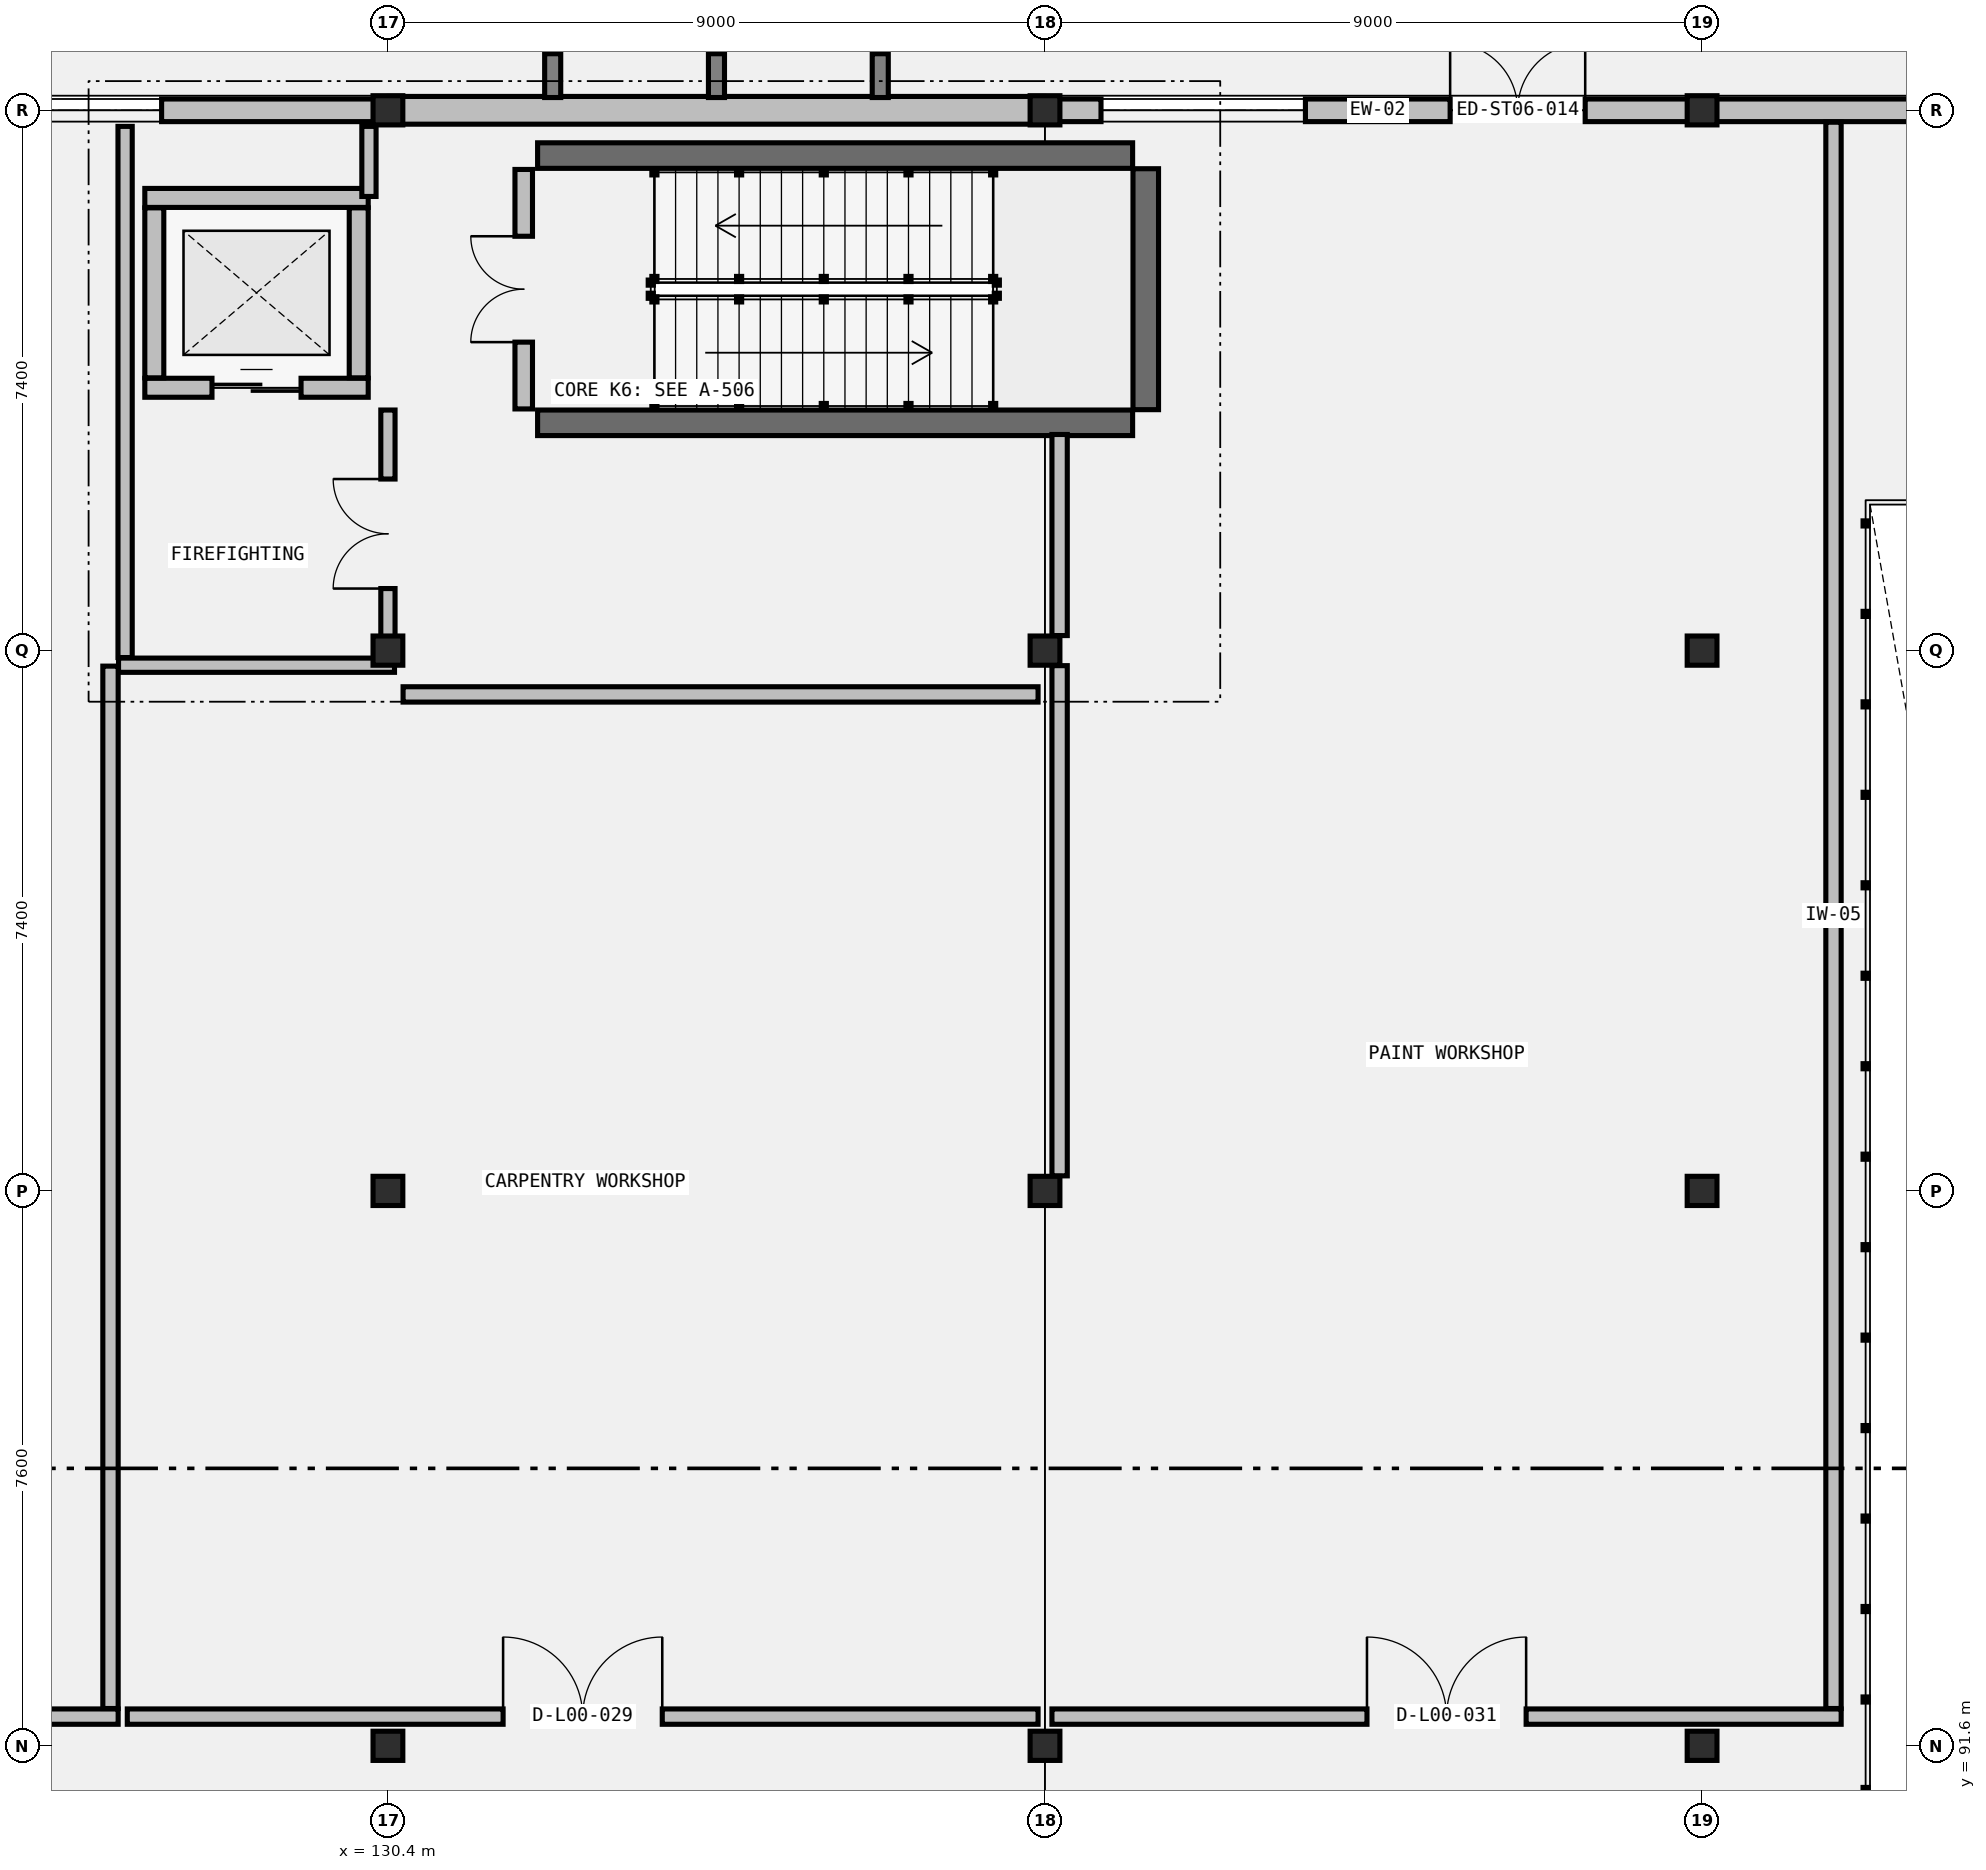
"""IFC4 building model, lengths in metres.
Left out: names, types, materials, properties, quantities, classifications, styles, units other than length and angle.
Written with IfcOpenShell. Run it as: python <this file> out.ifc"""

import sys

from ifc_helpers import new_model, si_unit, direction, frame, frame_2d, origin, origin_2d, place, context, subcontext, project, spatial, rectangle, i_section, extrude, element, fill, save


model = new_model("IFC4")
c1 = context("Model", 3, precision=1e-05, world=origin(), true_north=direction((0.0, 1.0)))
c2 = subcontext(c1, "Body", "Model", "MODEL_VIEW")
j1 = project(units=[si_unit("LENGTHUNIT", "METRE"), si_unit("PLANEANGLEUNIT", "RADIAN")], contexts=[c1])
p1 = place(None, origin())
s1 = spatial("IfcSite", under=j1, at=p1, CompositionType="ELEMENT")
p2 = place(p1, origin())
s2 = spatial("IfcBuilding", under=s1, at=p2, CompositionType="ELEMENT")
p3 = place(p2, origin())
s3 = spatial("IfcBuildingStorey", under=s2, at=p3, CompositionType="ELEMENT", Elevation=0.0)
for number, where, z_axis, x_axis in (
    (1, (130.4, 91.6, 0.0), (0.0, 0.0, 1.0), (1.0, 0.0, 0.0)),
    (2, (130.4, 99.2, 0.0), (0.0, 0.0, 1.0), (1.0, 0.0, 0.0)),
    (3, (130.4, 106.6, 0.0), (0.0, 0.0, 1.0), (1.0, 0.0, 0.0)),
    (4, (130.4, 114.0, 0.0), (0.0, 0.0, 1.0), (1.0, 0.0, 0.0)),
    (5, (139.4, 91.6, 0.0), (0.0, 0.0, 1.0), (1.0, 0.0, 0.0)),
    (6, (139.4, 99.2, 0.0), (0.0, 0.0, 1.0), (1.0, 0.0, 0.0)),
    (7, (139.4, 106.6, 0.0), (0.0, 0.0, 1.0), (1.0, 0.0, 0.0)),
    (8, (139.4, 114.0, 0.0), (0.0, 0.0, 1.0), (1.0, 0.0, 0.0)),
    (9, (148.4, 91.6, 0.0), (0.0, 0.0, 1.0), (1.0, 0.0, 0.0)),
    (10, (148.4, 99.2, 0.0), (0.0, 0.0, 1.0), (1.0, 0.0, 0.0)),
    (11, (148.4, 106.6, 0.0), (0.0, 0.0, 1.0), (1.0, 0.0, 0.0)),
    (12, (148.4, 114.0, 0.0), (0.0, 0.0, 1.0), (1.0, 0.0, 0.0)),
):
    element("IfcColumn", number, at=place(p3, frame(where, z_axis=z_axis, x_axis=x_axis)), inside=s3, PredefinedType="COLUMN", context=c2, shape_type="SweptSolid", body=[
        extrude(i_section(OverallWidth=0.408, OverallDepth=0.4, WebThickness=0.021, FlangeThickness=0.021, FilletRadius=0.022, at=origin_2d()), origin(), (0.0, 0.0, 1.0), 5.4),
    ])
p4 = place(p3, frame((132.45, 109.72, 0.0), z_axis=(0.0, 0.0, 1.0), x_axis=(1.0, 0.0, 0.0)))
e13 = element("IfcWall", 13, at=p4, inside=s3, PredefinedType="SHEAR", context=c2, shape_type="SweptSolid", body=[
    extrude(rectangle(XDim=8.15, YDim=0.35, at=frame_2d((4.075, 0.0))), origin(), (0.0, 0.0, 1.0), 5.16),
])
p5 = place(p3, frame((140.78, 109.9, 0.0), z_axis=(0.0, 0.0, 1.0), x_axis=(0.0, 1.0, 0.0)))
e14 = element("IfcWall", 14, at=p5, inside=s3, PredefinedType="SHEAR", context=c2, shape_type="SweptSolid", body=[
    extrude(rectangle(XDim=3.3, YDim=0.35, at=frame_2d((1.65, 0.0))), origin(), (0.0, 0.0, 1.0), 5.16),
])
p6 = place(p3, frame((140.6, 113.38, 0.0), z_axis=(0.0, 0.0, 1.0), x_axis=(-1.0, 0.0, 0.0)))
e15 = element("IfcWall", 15, at=p6, inside=s3, PredefinedType="SHEAR", context=c2, shape_type="SweptSolid", body=[
    extrude(rectangle(XDim=8.15, YDim=0.35, at=frame_2d((4.075, 0.0))), origin(), (0.0, 0.0, 1.0), 5.16),
])
p7 = place(p3, frame((121.414, 114.0, 0.0), z_axis=(0.0, 0.0, 1.0), x_axis=(1.0, 0.0, 0.0)))
e16 = element("IfcWall", 16, at=p7, inside=s3, PredefinedType="STANDARD", context=c2, shape_type="SweptSolid", body=[
    extrude(rectangle(XDim=8.973, YDim=0.31, at=frame_2d((4.486, 0.0))), origin(), (0.0, 0.0, 1.0), 4.55),
])
p8 = place(p7, frame((3.086, 0.0, 0.9)))
e17 = element("IfcOpeningElement", 17, at=p8, cuts=e16, PredefinedType="OPENING", context=c2, shape_type="SweptSolid", body=[
    extrude(rectangle(XDim=2.8, YDim=1.5, at=frame_2d((1.4, 0.75))), frame((0.0, 0.165, 0.0), z_axis=(0.0, -1.0, 0.0), x_axis=(1.0, 0.0, 0.0)), (0.0, 0.0, 1.0), 0.33),
])
p9 = place(p3, frame((130.414, 114.0, 0.0), z_axis=(0.0, 0.0, 1.0), x_axis=(1.0, 0.0, 0.0)))
e18 = element("IfcWall", 18, at=p9, inside=s3, PredefinedType="STANDARD", context=c2, shape_type="SweptSolid", body=[
    extrude(rectangle(XDim=8.973, YDim=0.38, at=frame_2d((4.486, 0.0))), origin(), (0.0, 0.0, 1.0), 4.55),
])
p10 = place(p3, frame((139.414, 114.0, 0.0), z_axis=(0.0, 0.0, 1.0), x_axis=(1.0, 0.0, 0.0)))
e19 = element("IfcWall", 19, at=p10, inside=s3, PredefinedType="STANDARD", context=c2, shape_type="SweptSolid", body=[
    extrude(rectangle(XDim=8.973, YDim=0.31, at=frame_2d((4.486, 0.0))), origin(), (0.0, 0.0, 1.0), 4.55),
])
p11 = place(p10, frame((0.753, 0.0, 0.9)))
e20 = element("IfcOpeningElement", 20, at=p11, cuts=e19, PredefinedType="OPENING", context=c2, shape_type="SweptSolid", body=[
    extrude(rectangle(XDim=2.8, YDim=1.5, at=frame_2d((1.4, 0.75))), frame((0.0, 0.165, 0.0), z_axis=(0.0, -1.0, 0.0), x_axis=(1.0, 0.0, 0.0)), (0.0, 0.0, 1.0), 0.33),
])
p12 = place(p10, frame((5.536, 0.0, 0.0)))
e21 = element("IfcOpeningElement", 21, at=p12, cuts=e19, PredefinedType="OPENING", context=c2, shape_type="SweptSolid", body=[
    extrude(rectangle(XDim=1.85, YDim=2.35, at=frame_2d((0.925, 1.175))), frame((0.0, 0.165, 0.0), z_axis=(0.0, -1.0, 0.0), x_axis=(1.0, 0.0, 0.0)), (0.0, 0.0, 1.0), 0.33),
])
p13 = place(p3, frame((148.414, 114.0, 0.0), z_axis=(0.0, 0.0, 1.0), x_axis=(1.0, 0.0, 0.0)))
e22 = element("IfcWall", 22, at=p13, inside=s3, PredefinedType="STANDARD", context=c2, shape_type="SweptSolid", body=[
    extrude(rectangle(XDim=8.773, YDim=0.31, at=frame_2d((4.386, 0.0))), origin(), (0.0, 0.0, 1.0), 4.55),
])
p14 = place(p13, frame((3.461, 0.0, 0.0)))
e23 = element("IfcOpeningElement", 23, at=p14, cuts=e22, PredefinedType="OPENING", context=c2, shape_type="SweptSolid", body=[
    extrude(rectangle(XDim=1.85, YDim=2.35, at=frame_2d((0.925, 1.175))), frame((0.0, 0.165, 0.0), z_axis=(0.0, -1.0, 0.0), x_axis=(1.0, 0.0, 0.0)), (0.0, 0.0, 1.0), 0.33),
])
p15 = place(p3, frame((132.26, 109.91, 0.0), z_axis=(0.0, 0.0, 1.0), x_axis=(0.0, 1.0, 0.0)))
e24 = element("IfcWall", 24, at=p15, inside=s3, PredefinedType="STANDARD", context=c2, shape_type="SweptSolid", body=[
    extrude(rectangle(XDim=3.28, YDim=0.24, at=frame_2d((1.64, 0.0))), origin(), (0.0, 0.0, 1.0), 5.16),
])
p16 = place(p15, frame((0.915, 0.0, 0.0)))
e25 = element("IfcOpeningElement", 25, at=p16, cuts=e24, PredefinedType="OPENING", context=c2, shape_type="SweptSolid", body=[
    extrude(rectangle(XDim=1.45, YDim=2.2, at=frame_2d((0.725, 1.1))), frame((0.0, 0.13, 0.0), z_axis=(0.0, -1.0, 0.0), x_axis=(1.0, 0.0, 0.0)), (0.0, 0.0, 1.0), 0.26),
])
p17 = place(p3, frame((127.07, 110.2, 0.0), z_axis=(0.0, 0.0, 1.0), x_axis=(1.0, 0.0, 0.0)))
e26 = element("IfcWall", 26, at=p17, inside=s3, PredefinedType="STANDARD", context=c2, shape_type="SweptSolid", body=[
    extrude(rectangle(XDim=3.06, YDim=0.26, at=frame_2d((1.53, 0.0))), origin(), (0.0, 0.0, 1.0), 4.748),
])
p18 = place(p17, frame((0.92, 0.0, 0.0)))
e27 = element("IfcOpeningElement", 27, at=p18, cuts=e26, PredefinedType="OPENING", context=c2, shape_type="SweptSolid", body=[
    extrude(rectangle(XDim=1.22, YDim=2.2, at=frame_2d((0.61, 1.1))), frame((0.0, 0.14, 0.0), z_axis=(0.0, -1.0, 0.0), x_axis=(1.0, 0.0, 0.0)), (0.0, 0.0, 1.0), 0.28),
])
p19 = place(p3, frame((127.07, 112.8, 0.0), z_axis=(0.0, 0.0, 1.0), x_axis=(1.0, 0.0, 0.0)))
e28 = element("IfcWall", 28, at=p19, inside=s3, PredefinedType="STANDARD", context=c2, shape_type="SweptSolid", body=[
    extrude(rectangle(XDim=3.06, YDim=0.26, at=frame_2d((1.53, 0.0))), origin(), (0.0, 0.0, 1.0), 4.748),
])
for number, where, z_axis, x_axis in (
    (29, (127.2, 110.336, 0.0), (0.0, 0.0, 1.0), (0.0, 1.0, 0.0)),
    (30, (130.0, 110.336, 0.0), (0.0, 0.0, 1.0), (0.0, 1.0, 0.0)),
):
    element("IfcWall", number, at=place(p3, frame(where, z_axis=z_axis, x_axis=x_axis)), inside=s3, PredefinedType="STANDARD", context=c2, shape_type="SweptSolid", body=[
        extrude(rectangle(XDim=2.328, YDim=0.26, at=frame_2d((1.164, 0.0))), origin(), (0.0, 0.0, 1.0), 5.16),
    ])
p20 = place(p3, frame((126.8, 106.505, 0.0), z_axis=(0.0, 0.0, 1.0), x_axis=(0.0, 1.0, 0.0)))
e31 = element("IfcWall", 31, at=p20, inside=s3, PredefinedType="PARTITIONING", context=c2, shape_type="SweptSolid", body=[
    extrude(rectangle(XDim=7.275, YDim=0.195, at=frame_2d((3.638, 0.0))), origin(), (0.0, 0.0, 1.0), 4.55),
])
p21 = place(p3, frame((126.71, 106.4, 0.0), z_axis=(0.0, 0.0, 1.0), x_axis=(1.0, 0.0, 0.0)))
e32 = element("IfcWall", 32, at=p21, inside=s3, PredefinedType="PARTITIONING", context=c2, shape_type="SweptSolid", body=[
    extrude(rectangle(XDim=3.78, YDim=0.195, at=frame_2d((1.89, 0.0))), origin(), (0.0, 0.0, 1.0), 4.55),
])
p22 = place(p3, frame((130.4, 106.505, 0.0), z_axis=(0.0, 0.0, 1.0), x_axis=(0.0, 1.0, 0.0)))
e33 = element("IfcWall", 33, at=p22, inside=s3, PredefinedType="PARTITIONING", context=c2, shape_type="SweptSolid", body=[
    extrude(rectangle(XDim=3.39, YDim=0.195, at=frame_2d((1.695, 0.0))), origin(), (0.0, 0.0, 1.0), 4.55),
])
p23 = place(p22, frame((0.945, 0.0, 0.0)))
e34 = element("IfcOpeningElement", 34, at=p23, cuts=e33, PredefinedType="OPENING", context=c2, shape_type="SweptSolid", body=[
    extrude(rectangle(XDim=1.5, YDim=2.2, at=frame_2d((0.75, 1.1))), frame((0.0, 0.107, 0.0), z_axis=(0.0, -1.0, 0.0), x_axis=(1.0, 0.0, 0.0)), (0.0, 0.0, 1.0), 0.215),
])
p24 = place(p3, frame((130.14, 112.82, 0.0), z_axis=(0.0, 0.0, 1.0), x_axis=(0.0, 1.0, 0.0)))
e35 = element("IfcWall", 35, at=p24, inside=s3, PredefinedType="PARTITIONING", context=c2, shape_type="SweptSolid", body=[
    extrude(rectangle(XDim=0.96, YDim=0.195, at=frame_2d((0.48, 0.0))), origin(), (0.0, 0.0, 1.0), 4.55),
])
p25 = place(p3, frame((112.858, 92.0, 0.0), z_axis=(0.0, 0.0, 1.0), x_axis=(1.0, 0.0, 0.0)))
e36 = element("IfcWall", 36, at=p25, inside=s3, PredefinedType="PARTITIONING", context=c2, shape_type="SweptSolid", body=[
    extrude(rectangle(XDim=13.847, YDim=0.21, at=frame_2d((6.924, 0.0))), origin(), (0.0, 0.0, 1.0), 5.16),
])
p26 = place(p25, frame((5.833, 0.0, 0.0)))
e37 = element("IfcOpeningElement", 37, at=p26, cuts=e36, PredefinedType="OPENING", context=c2, shape_type="SweptSolid", body=[
    extrude(rectangle(XDim=2.18, YDim=2.58, at=frame_2d((1.09, 1.29))), frame((0.0, 0.115, 0.0), z_axis=(0.0, -1.0, 0.0), x_axis=(1.0, 0.0, 0.0)), (0.0, 0.0, 1.0), 0.23),
])
p27 = place(p3, frame((126.6, 92.111, 0.0), z_axis=(0.0, 0.0, 1.0), x_axis=(0.0, 1.0, 0.0)))
e38 = element("IfcWall", 38, at=p27, inside=s3, PredefinedType="PARTITIONING", context=c2, shape_type="SweptSolid", body=[
    extrude(rectangle(XDim=14.276, YDim=0.21, at=frame_2d((7.138, 0.0))), origin(), (0.0, 0.0, 1.0), 5.16),
])
p28 = place(p3, frame((126.83, 92.0, 0.0), z_axis=(0.0, 0.0, 1.0), x_axis=(1.0, 0.0, 0.0)))
e39 = element("IfcWall", 39, at=p28, inside=s3, PredefinedType="PARTITIONING", context=c2, shape_type="SweptSolid", body=[
    extrude(rectangle(XDim=12.475, YDim=0.21, at=frame_2d((6.237, 0.0))), origin(), (0.0, 0.0, 1.0), 4.748),
])
p29 = place(p28, frame((5.147, 0.0, 0.0)))
e40 = element("IfcOpeningElement", 40, at=p29, cuts=e39, PredefinedType="OPENING", context=c2, shape_type="SweptSolid", body=[
    extrude(rectangle(XDim=2.18, YDim=2.58, at=frame_2d((1.09, 1.29))), frame((0.0, 0.115, 0.0), z_axis=(0.0, -1.0, 0.0), x_axis=(1.0, 0.0, 0.0)), (0.0, 0.0, 1.0), 0.23),
])
p30 = place(p3, frame((130.607, 106.0, 0.0), z_axis=(0.0, 0.0, 1.0), x_axis=(1.0, 0.0, 0.0)))
e41 = element("IfcWall", 41, at=p30, inside=s3, PredefinedType="PARTITIONING", context=c2, shape_type="SweptSolid", body=[
    extrude(rectangle(XDim=8.698, YDim=0.21, at=frame_2d((4.349, 0.0))), origin(), (0.0, 0.0, 1.0), 4.748),
])
p31 = place(p3, frame((139.495, 92.0, 0.0), z_axis=(0.0, 0.0, 1.0), x_axis=(1.0, 0.0, 0.0)))
e42 = element("IfcWall", 42, at=p31, inside=s3, PredefinedType="PARTITIONING", context=c2, shape_type="SweptSolid", body=[
    extrude(rectangle(XDim=10.81, YDim=0.21, at=frame_2d((5.405, 0.0))), origin(), (0.0, 0.0, 1.0), 4.748),
])
p32 = place(p31, frame((4.315, 0.0, 0.0)))
e43 = element("IfcOpeningElement", 43, at=p32, cuts=e42, PredefinedType="OPENING", context=c2, shape_type="SweptSolid", body=[
    extrude(rectangle(XDim=2.18, YDim=2.58, at=frame_2d((1.09, 1.29))), frame((0.0, 0.115, 0.0), z_axis=(0.0, -1.0, 0.0), x_axis=(1.0, 0.0, 0.0)), (0.0, 0.0, 1.0), 0.23),
])
p33 = place(p3, frame((139.6, 106.806, 0.0), z_axis=(0.0, 0.0, 1.0), x_axis=(0.0, 1.0, 0.0)))
e44 = element("IfcWall", 44, at=p33, inside=s3, PredefinedType="PARTITIONING", context=c2, shape_type="SweptSolid", body=[
    extrude(rectangle(XDim=2.754, YDim=0.21, at=frame_2d((1.377, 0.0))), origin(), (0.0, 0.0, 1.0), 4.55),
])
p34 = place(p3, frame((139.6, 99.406, 0.0), z_axis=(0.0, 0.0, 1.0), x_axis=(0.0, 1.0, 0.0)))
e45 = element("IfcWall", 45, at=p34, inside=s3, PredefinedType="PARTITIONING", context=c2, shape_type="SweptSolid", body=[
    extrude(rectangle(XDim=6.988, YDim=0.21, at=frame_2d((3.494, 0.0))), origin(), (0.0, 0.0, 1.0), 4.55),
])
p35 = place(p3, frame((150.2, 92.111, 0.0), z_axis=(0.0, 0.0, 1.0), x_axis=(0.0, 1.0, 0.0)))
e46 = element("IfcWall", 46, at=p35, inside=s3, PredefinedType="PARTITIONING", context=c2, shape_type="SweptSolid", body=[
    extrude(rectangle(XDim=21.726, YDim=0.21, at=frame_2d((10.863, 0.0))), origin(), (0.0, 0.0, 1.0), 4.55),
])
p36 = place(p8, origin())
e47 = element("IfcWindow", 47, at=p36, inside=s3, PartitioningType="TRIPLE_PANEL_VERTICAL", PredefinedType="WINDOW", context=c2, shape_type="SweptSolid", body=[
    extrude(rectangle(XDim=2.8, YDim=1.5, at=frame_2d((1.4, 0.75))), frame((0.0, 0.03, 0.0), z_axis=(0.0, -1.0, 0.0), x_axis=(1.0, 0.0, 0.0)), (0.0, 0.0, 1.0), 0.06),
])
fill(e17, e47)
p37 = place(p11, origin())
e48 = element("IfcWindow", 48, at=p37, inside=s3, PartitioningType="TRIPLE_PANEL_VERTICAL", PredefinedType="WINDOW", context=c2, shape_type="SweptSolid", body=[
    extrude(rectangle(XDim=2.8, YDim=1.5, at=frame_2d((1.4, 0.75))), frame((0.0, 0.03, 0.0), z_axis=(0.0, -1.0, 0.0), x_axis=(1.0, 0.0, 0.0)), (0.0, 0.0, 1.0), 0.06),
])
fill(e20, e48)
p38 = place(p12, origin())
e49 = element("IfcDoor", 49, at=p38, inside=s3, OperationType="DOUBLE_DOOR_SINGLE_SWING", PredefinedType="DOOR", context=c2, shape_type="SweptSolid", body=[
    extrude(rectangle(XDim=1.85, YDim=2.35, at=frame_2d((0.925, 1.175))), frame((0.0, 0.025, 0.0), z_axis=(0.0, -1.0, 0.0), x_axis=(1.0, 0.0, 0.0)), (0.0, 0.0, 1.0), 0.05),
])
fill(e21, e49)
p39 = place(p16, origin())
e50 = element("IfcDoor", 50, at=p39, inside=s3, OperationType="DOUBLE_DOOR_SINGLE_SWING", PredefinedType="DOOR", context=c2, shape_type="SweptSolid", body=[
    extrude(rectangle(XDim=1.45, YDim=2.2, at=frame_2d((0.725, 1.1))), frame((0.0, 0.025, 0.0), z_axis=(0.0, -1.0, 0.0), x_axis=(1.0, 0.0, 0.0)), (0.0, 0.0, 1.0), 0.05),
])
fill(e25, e50)
p40 = place(p18, origin())
e51 = element("IfcDoor", 51, at=p40, inside=s3, OperationType="SLIDING_TO_RIGHT", PredefinedType="DOOR", context=c2, shape_type="SweptSolid", body=[
    extrude(rectangle(XDim=1.22, YDim=2.2, at=frame_2d((0.61, 1.1))), frame((0.0, 0.025, 0.0), z_axis=(0.0, -1.0, 0.0), x_axis=(1.0, 0.0, 0.0)), (0.0, 0.0, 1.0), 0.05),
])
fill(e27, e51)
p41 = place(p23, origin())
e52 = element("IfcDoor", 52, at=p41, inside=s3, OperationType="DOUBLE_DOOR_SINGLE_SWING", PredefinedType="DOOR", context=c2, shape_type="SweptSolid", body=[
    extrude(rectangle(XDim=1.5, YDim=2.2, at=frame_2d((0.75, 1.1))), frame((0.0, 0.025, 0.0), z_axis=(0.0, -1.0, 0.0), x_axis=(1.0, 0.0, 0.0)), (0.0, 0.0, 1.0), 0.05),
])
fill(e34, e52)
p42 = place(p29, origin())
e53 = element("IfcDoor", 53, at=p42, inside=s3, OperationType="DOUBLE_DOOR_SINGLE_SWING", PredefinedType="DOOR", context=c2, shape_type="SweptSolid", body=[
    extrude(rectangle(XDim=2.18, YDim=2.58, at=frame_2d((1.09, 1.29))), frame((0.0, 0.025, 0.0), z_axis=(0.0, -1.0, 0.0), x_axis=(1.0, 0.0, 0.0)), (0.0, 0.0, 1.0), 0.05),
])
fill(e40, e53)
p43 = place(p32, origin())
e54 = element("IfcDoor", 54, at=p43, inside=s3, OperationType="DOUBLE_DOOR_SINGLE_SWING", PredefinedType="DOOR", context=c2, shape_type="SweptSolid", body=[
    extrude(rectangle(XDim=2.18, YDim=2.58, at=frame_2d((1.09, 1.29))), frame((0.0, 0.025, 0.0), z_axis=(0.0, -1.0, 0.0), x_axis=(1.0, 0.0, 0.0)), (0.0, 0.0, 1.0), 0.05),
])
fill(e43, e54)
save(model, sys.argv[1])
